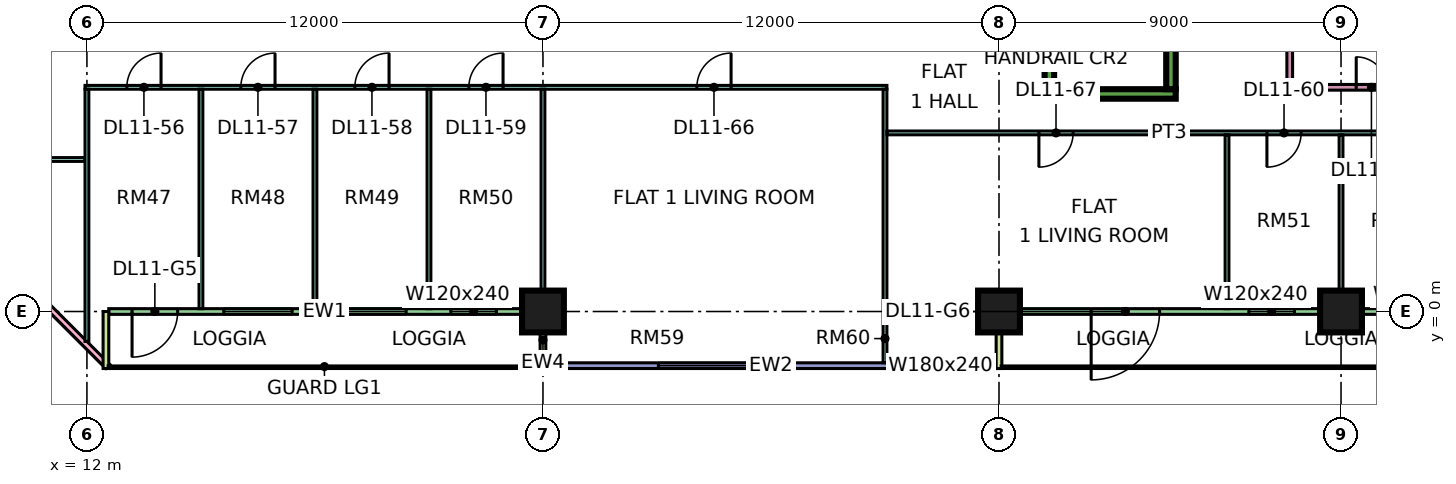
"""IFC4 building model, lengths in metres.
Left out: names, types, materials, properties, quantities, classifications, styles, units other than length and angle.
Written with IfcOpenShell. Run it as: python <this file> out.ifc"""

import sys

from ifc_helpers import new_model, si_unit, direction, frame, frame_2d, origin, origin_2d, place, context, subcontext, project, spatial, rectangle, extrude, element, fill, save


model = new_model("IFC4")
c1 = context("Model", 3, precision=1e-05, world=origin(), true_north=direction((0.0, 1.0)))
c2 = subcontext(c1, "Body", "Model", "MODEL_VIEW")
j1 = project(units=[si_unit("LENGTHUNIT", "METRE"), si_unit("PLANEANGLEUNIT", "RADIAN")], contexts=[c1])
p1 = place(None, origin())
s1 = spatial("IfcSite", under=j1, at=p1, CompositionType="ELEMENT")
p2 = place(p1, origin())
s2 = spatial("IfcBuilding", under=s1, at=p2, CompositionType="ELEMENT")
p3 = place(p2, frame((0.0, 0.0, 56.4)))
s3 = spatial("IfcBuildingStorey", under=s2, at=p3, CompositionType="ELEMENT", Elevation=56.4)
for number, where, z_axis, x_axis in (
    (1, (24.0, 0.0, 0.0), (0.0, 0.0, 1.0), (1.0, 0.0, 0.0)),
    (2, (36.0, 0.0, 0.0), (0.0, 0.0, 1.0), (1.0, 0.0, 0.0)),
    (3, (45.0, 0.0, 0.0), (0.0, 0.0, 1.0), (1.0, 0.0, 0.0)),
):
    element("IfcColumn", number, at=place(p3, frame(where, z_axis=z_axis, x_axis=x_axis)), inside=s3, PredefinedType="COLUMN", context=c2, shape_type="SweptSolid", body=[
        extrude(rectangle(XDim=1.1, YDim=1.1, at=origin_2d()), origin(), (0.0, 0.0, 1.0), 3.75),
    ])
p4 = place(p3, frame((37.2, 5.725, 0.0), z_axis=(0.0, 0.0, 1.0), x_axis=(1.0, 0.0, 0.0)))
e4 = element("IfcWall", 4, at=p4, inside=s3, PredefinedType="SHEAR", context=c2, shape_type="SweptSolid", body=[
    extrude(rectangle(XDim=3.45, YDim=0.25, at=frame_2d((1.725, 0.0))), origin(), (0.0, 0.0, 1.0), 3.75),
])
for number, where, z_axis, x_axis in (
    (5, (37.325, 5.85, 0.0), (0.0, 0.0, 1.0), (0.0, 1.0, 0.0)),
    (6, (40.525, 5.85, 0.0), (0.0, 0.0, 1.0), (0.0, 1.0, 0.0)),
):
    element("IfcWall", number, at=place(p3, frame(where, z_axis=z_axis, x_axis=x_axis)), inside=s3, PredefinedType="SHEAR", context=c2, shape_type="SweptSolid", body=[
        extrude(rectangle(XDim=6.5, YDim=0.25, at=frame_2d((3.25, 0.0))), origin(), (0.0, 0.0, 1.0), 3.75),
    ])
p5 = place(p3, frame((-1.447, 12.553, 0.0), z_axis=(0.0, 0.0, 1.0), x_axis=(0.707106781187, -0.707106781187, 0.0)))
e7 = element("IfcWall", 7, at=p5, inside=s3, PredefinedType="SOLIDWALL", context=c2, shape_type="SweptSolid", body=[
    extrude(rectangle(XDim=19.799, YDim=0.15, at=frame_2d((9.899, 0.0))), origin(), (0.0, 0.0, 1.0), 3.35),
])
p6 = place(p5, frame((2.212, 0.0, 0.45)))
e8 = element("IfcOpeningElement", 8, at=p6, cuts=e7, PredefinedType="OPENING", context=c2, shape_type="SweptSolid", body=[
    extrude(rectangle(XDim=3.0, YDim=2.4, at=frame_2d((1.5, 1.2))), frame((0.0, 0.085, 0.0), z_axis=(0.0, -1.0, 0.0), x_axis=(1.0, 0.0, 0.0)), (0.0, 0.0, 1.0), 0.17),
])
p7 = place(p5, frame((10.216, 0.0, 0.45)))
e9 = element("IfcOpeningElement", 9, at=p7, cuts=e7, PredefinedType="OPENING", context=c2, shape_type="SweptSolid", body=[
    extrude(rectangle(XDim=3.0, YDim=2.4, at=frame_2d((1.5, 1.2))), frame((0.0, 0.085, 0.0), z_axis=(0.0, -1.0, 0.0), x_axis=(1.0, 0.0, 0.0)), (0.0, 0.0, 1.0), 0.17),
])
p8 = place(p3, frame((12.575, 0.0, 0.0), z_axis=(0.0, 0.0, 1.0), x_axis=(1.0, 0.0, 0.0)))
e10 = element("IfcWall", 10, at=p8, inside=s3, PredefinedType="SOLIDWALL", context=c2, shape_type="SweptSolid", body=[
    extrude(rectangle(XDim=11.35, YDim=0.15, at=frame_2d((5.675, 0.0))), origin(), (0.0, 0.0, 1.0), 3.35),
])
p9 = place(p8, frame((0.613, 0.0, 0.0)))
e11 = element("IfcOpeningElement", 11, at=p9, cuts=e10, PredefinedType="OPENING", context=c2, shape_type="SweptSolid", body=[
    extrude(rectangle(XDim=1.2, YDim=2.4, at=frame_2d((0.6, 1.2))), frame((0.0, 0.085, 0.0), z_axis=(0.0, -1.0, 0.0), x_axis=(1.0, 0.0, 0.0)), (0.0, 0.0, 1.0), 0.17),
])
p10 = place(p8, frame((3.025, 0.0, 0.45)))
e12 = element("IfcOpeningElement", 12, at=p10, cuts=e10, PredefinedType="OPENING", context=c2, shape_type="SweptSolid", body=[
    extrude(rectangle(XDim=1.8, YDim=2.4, at=frame_2d((0.9, 1.2))), frame((0.0, 0.085, 0.0), z_axis=(0.0, -1.0, 0.0), x_axis=(1.0, 0.0, 0.0)), (0.0, 0.0, 1.0), 0.17),
])
p11 = place(p8, frame((6.025, 0.0, 0.45)))
e13 = element("IfcOpeningElement", 13, at=p11, cuts=e10, PredefinedType="OPENING", context=c2, shape_type="SweptSolid", body=[
    extrude(rectangle(XDim=1.8, YDim=2.4, at=frame_2d((0.9, 1.2))), frame((0.0, 0.085, 0.0), z_axis=(0.0, -1.0, 0.0), x_axis=(1.0, 0.0, 0.0)), (0.0, 0.0, 1.0), 0.17),
])
p12 = place(p8, frame((9.0, 0.0, 0.45)))
e14 = element("IfcOpeningElement", 14, at=p12, cuts=e10, PredefinedType="OPENING", context=c2, shape_type="SweptSolid", body=[
    extrude(rectangle(XDim=1.2, YDim=2.4, at=frame_2d((0.6, 1.2))), frame((0.0, 0.085, 0.0), z_axis=(0.0, -1.0, 0.0), x_axis=(1.0, 0.0, 0.0)), (0.0, 0.0, 1.0), 0.17),
])
for number, where, z_axis, x_axis in (
    (15, (12.5, -1.5, 0.0), (0.0, 0.0, 1.0), (0.0, 1.0, 0.0)),
    (16, (24.0, -1.5, 0.0), (0.0, 0.0, 1.0), (0.0, 1.0, 0.0)),
):
    element("IfcWall", number, at=place(p3, frame(where, z_axis=z_axis, x_axis=x_axis)), inside=s3, PredefinedType="SOLIDWALL", context=c2, shape_type="SweptSolid", body=[
        extrude(rectangle(XDim=1.5, YDim=0.15, at=frame_2d((0.75, 0.0))), origin(), (0.0, 0.0, 1.0), 3.35),
    ])
p13 = place(p3, frame((24.075, -1.425, 0.0), z_axis=(0.0, 0.0, 1.0), x_axis=(1.0, 0.0, 0.0)))
e17 = element("IfcWall", 17, at=p13, inside=s3, PredefinedType="SOLIDWALL", context=c2, shape_type="SweptSolid", body=[
    extrude(rectangle(XDim=11.85, YDim=0.15, at=frame_2d((5.925, 0.0))), origin(), (0.0, 0.0, 1.0), 3.35),
])
p14 = place(p13, frame((2.962, 0.0, 0.45)))
e18 = element("IfcOpeningElement", 18, at=p14, cuts=e17, PredefinedType="OPENING", context=c2, shape_type="SweptSolid", body=[
    extrude(rectangle(XDim=3.0, YDim=2.4, at=frame_2d((1.5, 1.2))), frame((0.0, 0.085, 0.0), z_axis=(0.0, -1.0, 0.0), x_axis=(1.0, 0.0, 0.0)), (0.0, 0.0, 1.0), 0.17),
])
p15 = place(p13, frame((9.488, 0.0, 0.45)))
e19 = element("IfcOpeningElement", 19, at=p15, cuts=e17, PredefinedType="OPENING", context=c2, shape_type="SweptSolid", body=[
    extrude(rectangle(XDim=1.8, YDim=2.4, at=frame_2d((0.9, 1.2))), frame((0.0, 0.085, 0.0), z_axis=(0.0, -1.0, 0.0), x_axis=(1.0, 0.0, 0.0)), (0.0, 0.0, 1.0), 0.17),
])
p16 = place(p3, frame((36.075, 0.0, 0.0), z_axis=(0.0, 0.0, 1.0), x_axis=(1.0, 0.0, 0.0)))
e20 = element("IfcWall", 20, at=p16, inside=s3, PredefinedType="SOLIDWALL", context=c2, shape_type="SweptSolid", body=[
    extrude(rectangle(XDim=11.85, YDim=0.15, at=frame_2d((5.925, 0.0))), origin(), (0.0, 0.0, 1.0), 3.35),
])
p17 = place(p16, frame((2.35, 0.0, 0.0)))
e21 = element("IfcOpeningElement", 21, at=p17, cuts=e20, PredefinedType="OPENING", context=c2, shape_type="SweptSolid", body=[
    extrude(rectangle(XDim=1.8, YDim=2.4, at=frame_2d((0.9, 1.2))), frame((0.0, 0.085, 0.0), z_axis=(0.0, -1.0, 0.0), x_axis=(1.0, 0.0, 0.0)), (0.0, 0.0, 1.0), 0.17),
])
p18 = place(p16, frame((6.5, 0.0, 0.45)))
e22 = element("IfcOpeningElement", 22, at=p18, cuts=e20, PredefinedType="OPENING", context=c2, shape_type="SweptSolid", body=[
    extrude(rectangle(XDim=1.2, YDim=2.4, at=frame_2d((0.6, 1.2))), frame((0.0, 0.085, 0.0), z_axis=(0.0, -1.0, 0.0), x_axis=(1.0, 0.0, 0.0)), (0.0, 0.0, 1.0), 0.17),
])
p19 = place(p16, frame((10.113, 0.0, 0.45)))
e23 = element("IfcOpeningElement", 23, at=p19, cuts=e20, PredefinedType="OPENING", context=c2, shape_type="SweptSolid", body=[
    extrude(rectangle(XDim=1.2, YDim=2.4, at=frame_2d((0.6, 1.2))), frame((0.0, 0.085, 0.0), z_axis=(0.0, -1.0, 0.0), x_axis=(1.0, 0.0, 0.0)), (0.0, 0.0, 1.0), 0.17),
])
p20 = place(p3, frame((36.0, -1.5, 0.0), z_axis=(0.0, 0.0, 1.0), x_axis=(0.0, 1.0, 0.0)))
e24 = element("IfcWall", 24, at=p20, inside=s3, PredefinedType="SOLIDWALL", context=c2, shape_type="SweptSolid", body=[
    extrude(rectangle(XDim=1.5, YDim=0.15, at=frame_2d((0.75, 0.0))), origin(), (0.0, 0.0, 1.0), 3.35),
])
p21 = place(p3, frame((9.05, 4.0, 0.0), z_axis=(0.0, 0.0, 1.0), x_axis=(1.0, 0.0, 0.0)))
e25 = element("IfcWall", 25, at=p21, inside=s3, PredefinedType="PARTITIONING", context=c2, shape_type="SweptSolid", body=[
    extrude(rectangle(XDim=2.9, YDim=0.1, at=frame_2d((1.45, 0.0))), origin(), (0.0, 0.0, 1.0), 3.35),
])
p22 = place(p3, frame((11.95, 5.9, 0.0), z_axis=(0.0, 0.0, 1.0), x_axis=(1.0, 0.0, 0.0)))
e26 = element("IfcWall", 26, at=p22, inside=s3, PredefinedType="PARTITIONING", context=c2, shape_type="SweptSolid", body=[
    extrude(rectangle(XDim=21.1, YDim=0.1, at=frame_2d((10.55, 0.0))), origin(), (0.0, 0.0, 1.0), 3.35),
])
p23 = place(p22, frame((1.1, 0.0, 0.0)))
e27 = element("IfcOpeningElement", 27, at=p23, cuts=e26, PredefinedType="OPENING", context=c2, shape_type="SweptSolid", body=[
    extrude(rectangle(XDim=0.9, YDim=2.1, at=frame_2d((0.45, 1.05))), frame((0.0, 0.06, 0.0), z_axis=(0.0, -1.0, 0.0), x_axis=(1.0, 0.0, 0.0)), (0.0, 0.0, 1.0), 0.12),
])
p24 = place(p22, frame((4.1, 0.0, 0.0)))
e28 = element("IfcOpeningElement", 28, at=p24, cuts=e26, PredefinedType="OPENING", context=c2, shape_type="SweptSolid", body=[
    extrude(rectangle(XDim=0.9, YDim=2.1, at=frame_2d((0.45, 1.05))), frame((0.0, 0.06, 0.0), z_axis=(0.0, -1.0, 0.0), x_axis=(1.0, 0.0, 0.0)), (0.0, 0.0, 1.0), 0.12),
])
p25 = place(p22, frame((7.1, 0.0, 0.0)))
e29 = element("IfcOpeningElement", 29, at=p25, cuts=e26, PredefinedType="OPENING", context=c2, shape_type="SweptSolid", body=[
    extrude(rectangle(XDim=0.9, YDim=2.1, at=frame_2d((0.45, 1.05))), frame((0.0, 0.06, 0.0), z_axis=(0.0, -1.0, 0.0), x_axis=(1.0, 0.0, 0.0)), (0.0, 0.0, 1.0), 0.12),
])
p26 = place(p22, frame((10.1, 0.0, 0.0)))
e30 = element("IfcOpeningElement", 30, at=p26, cuts=e26, PredefinedType="OPENING", context=c2, shape_type="SweptSolid", body=[
    extrude(rectangle(XDim=0.9, YDim=2.1, at=frame_2d((0.45, 1.05))), frame((0.0, 0.06, 0.0), z_axis=(0.0, -1.0, 0.0), x_axis=(1.0, 0.0, 0.0)), (0.0, 0.0, 1.0), 0.12),
])
p27 = place(p22, frame((16.1, 0.0, 0.0)))
e31 = element("IfcOpeningElement", 31, at=p27, cuts=e26, PredefinedType="OPENING", context=c2, shape_type="SweptSolid", body=[
    extrude(rectangle(XDim=0.9, YDim=2.1, at=frame_2d((0.45, 1.05))), frame((0.0, 0.06, 0.0), z_axis=(0.0, -1.0, 0.0), x_axis=(1.0, 0.0, 0.0)), (0.0, 0.0, 1.0), 0.12),
])
p28 = place(p3, frame((12.0, -0.788, 0.0), z_axis=(0.0, 0.0, 1.0), x_axis=(0.0, 1.0, 0.0)))
e32 = element("IfcWall", 32, at=p28, inside=s3, PredefinedType="PARTITIONING", context=c2, shape_type="SweptSolid", body=[
    extrude(rectangle(XDim=6.638, YDim=0.1, at=frame_2d((3.319, 0.0))), origin(), (0.0, 0.0, 1.0), 3.35),
])
for number, where, z_axis, x_axis in (
    (33, (15.0, 0.074, 0.0), (0.0, 0.0, 1.0), (0.0, 1.0, 0.0)),
    (34, (18.0, 0.074, 0.0), (0.0, 0.0, 1.0), (0.0, 1.0, 0.0)),
    (35, (21.0, 0.074, 0.0), (0.0, 0.0, 1.0), (0.0, 1.0, 0.0)),
):
    element("IfcWall", number, at=place(p3, frame(where, z_axis=z_axis, x_axis=x_axis)), inside=s3, PredefinedType="PARTITIONING", context=c2, shape_type="SweptSolid", body=[
        extrude(rectangle(XDim=5.776, YDim=0.1, at=frame_2d((2.888, 0.0))), origin(), (0.0, 0.0, 1.0), 3.35),
    ])
p29 = place(p3, frame((24.0, 0.0, 0.0), z_axis=(0.0, 0.0, 1.0), x_axis=(0.0, 1.0, 0.0)))
e36 = element("IfcWall", 36, at=p29, inside=s3, PredefinedType="PARTITIONING", context=c2, shape_type="SweptSolid", body=[
    extrude(rectangle(XDim=5.85, YDim=0.1, at=frame_2d((2.925, 0.0))), origin(), (0.0, 0.0, 1.0), 3.35),
])
p30 = place(p3, frame((33.0, -1.35, 0.0), z_axis=(0.0, 0.0, 1.0), x_axis=(0.0, 1.0, 0.0)))
e37 = element("IfcWall", 37, at=p30, inside=s3, PredefinedType="PARTITIONING", context=c2, shape_type="SweptSolid", body=[
    extrude(rectangle(XDim=7.2, YDim=0.1, at=frame_2d((3.6, 0.0))), origin(), (0.0, 0.0, 1.0), 3.35),
])
p31 = place(p3, frame((33.05, 4.7, 0.0), z_axis=(0.0, 0.0, 1.0), x_axis=(1.0, 0.0, 0.0)))
e38 = element("IfcWall", 38, at=p31, inside=s3, PredefinedType="PARTITIONING", context=c2, shape_type="SweptSolid", body=[
    extrude(rectangle(XDim=14.85, YDim=0.1, at=frame_2d((7.425, 0.0))), origin(), (0.0, 0.0, 1.0), 3.35),
])
p32 = place(p31, frame((10.0, 0.0, 0.0)))
e39 = element("IfcOpeningElement", 39, at=p32, cuts=e38, PredefinedType="OPENING", context=c2, shape_type="SweptSolid", body=[
    extrude(rectangle(XDim=0.9, YDim=2.1, at=frame_2d((0.45, 1.05))), frame((0.0, 0.06, 0.0), z_axis=(0.0, -1.0, 0.0), x_axis=(1.0, 0.0, 0.0)), (0.0, 0.0, 1.0), 0.12),
])
p33 = place(p31, frame((13.0, 0.0, 0.0)))
e40 = element("IfcOpeningElement", 40, at=p33, cuts=e38, PredefinedType="OPENING", context=c2, shape_type="SweptSolid", body=[
    extrude(rectangle(XDim=0.9, YDim=2.1, at=frame_2d((0.45, 1.05))), frame((0.0, 0.06, 0.0), z_axis=(0.0, -1.0, 0.0), x_axis=(1.0, 0.0, 0.0)), (0.0, 0.0, 1.0), 0.12),
])
p34 = place(p31, frame((4.0, 0.0, 0.0)))
e41 = element("IfcOpeningElement", 41, at=p34, cuts=e38, PredefinedType="OPENING", context=c2, shape_type="SweptSolid", body=[
    extrude(rectangle(XDim=0.9, YDim=2.1, at=frame_2d((0.45, 1.05))), frame((0.0, 0.06, 0.0), z_axis=(0.0, -1.0, 0.0), x_axis=(1.0, 0.0, 0.0)), (0.0, 0.0, 1.0), 0.12),
])
p35 = place(p3, frame((42.0, 0.074, 0.0), z_axis=(0.0, 0.0, 1.0), x_axis=(0.0, 1.0, 0.0)))
e42 = element("IfcWall", 42, at=p35, inside=s3, PredefinedType="PARTITIONING", context=c2, shape_type="SweptSolid", body=[
    extrude(rectangle(XDim=4.576, YDim=0.1, at=frame_2d((2.288, 0.0))), origin(), (0.0, 0.0, 1.0), 3.35),
])
p36 = place(p3, frame((43.65, 5.825, 0.0), z_axis=(0.0, 0.0, 1.0), x_axis=(0.0, 1.0, 0.0)))
e43 = element("IfcWall", 43, at=p36, inside=s3, PredefinedType="PARTITIONING", context=c2, shape_type="SweptSolid", body=[
    extrude(rectangle(XDim=6.625, YDim=0.15, at=frame_2d((3.312, 0.0))), origin(), (0.0, 0.0, 1.0), 3.35),
])
p37 = place(p36, frame((4.425, 0.0, 0.0)))
e44 = element("IfcOpeningElement", 44, at=p37, cuts=e43, PredefinedType="OPENING", context=c2, shape_type="SweptSolid", body=[
    extrude(rectangle(XDim=0.9, YDim=2.1, at=frame_2d((0.45, 1.05))), frame((0.0, 0.085, 0.0), z_axis=(0.0, -1.0, 0.0), x_axis=(1.0, 0.0, 0.0)), (0.0, 0.0, 1.0), 0.17),
])
p38 = place(p3, frame((43.725, 5.9, 0.0), z_axis=(0.0, 0.0, 1.0), x_axis=(1.0, 0.0, 0.0)))
e45 = element("IfcWall", 45, at=p38, inside=s3, PredefinedType="PARTITIONING", context=c2, shape_type="SweptSolid", body=[
    extrude(rectangle(XDim=4.175, YDim=0.15, at=frame_2d((2.087, 0.0))), origin(), (0.0, 0.0, 1.0), 3.35),
])
p39 = place(p38, frame((1.675, 0.0, 0.0)))
e46 = element("IfcOpeningElement", 46, at=p39, cuts=e45, PredefinedType="OPENING", context=c2, shape_type="SweptSolid", body=[
    extrude(rectangle(XDim=0.8, YDim=2.1, at=frame_2d((0.4, 1.05))), frame((0.0, 0.085, 0.0), z_axis=(0.0, -1.0, 0.0), x_axis=(1.0, 0.0, 0.0)), (0.0, 0.0, 1.0), 0.17),
])
p40 = place(p3, frame((45.0, 0.074, 0.0), z_axis=(0.0, 0.0, 1.0), x_axis=(0.0, 1.0, 0.0)))
e47 = element("IfcWall", 47, at=p40, inside=s3, PredefinedType="PARTITIONING", context=c2, shape_type="SweptSolid", body=[
    extrude(rectangle(XDim=4.576, YDim=0.1, at=frame_2d((2.288, 0.0))), origin(), (0.0, 0.0, 1.0), 3.35),
])
p41 = place(p9, frame((1.2, 0.0, 0.0), z_axis=(0.0, 0.0, 1.0), x_axis=(-1.0, 0.0, 0.0)))
e48 = element("IfcDoor", 48, at=p41, inside=s3, OperationType="DOUBLE_DOOR_SINGLE_SWING", PredefinedType="DOOR", context=c2, shape_type="SweptSolid", body=[
    extrude(rectangle(XDim=1.2, YDim=2.4, at=frame_2d((0.6, 1.2))), frame((0.0, 0.025, 0.0), z_axis=(0.0, -1.0, 0.0), x_axis=(1.0, 0.0, 0.0)), (0.0, 0.0, 1.0), 0.05),
])
fill(e11, e48)
p42 = place(p10, origin())
e49 = element("IfcWindow", 49, at=p42, inside=s3, PartitioningType="SINGLE_PANEL", PredefinedType="WINDOW", context=c2, shape_type="SweptSolid", body=[
    extrude(rectangle(XDim=1.8, YDim=2.4, at=frame_2d((0.9, 1.2))), frame((0.0, 0.03, 0.0), z_axis=(0.0, -1.0, 0.0), x_axis=(1.0, 0.0, 0.0)), (0.0, 0.0, 1.0), 0.06),
])
fill(e12, e49)
p43 = place(p11, origin())
e50 = element("IfcWindow", 50, at=p43, inside=s3, PartitioningType="SINGLE_PANEL", PredefinedType="WINDOW", context=c2, shape_type="SweptSolid", body=[
    extrude(rectangle(XDim=1.8, YDim=2.4, at=frame_2d((0.9, 1.2))), frame((0.0, 0.03, 0.0), z_axis=(0.0, -1.0, 0.0), x_axis=(1.0, 0.0, 0.0)), (0.0, 0.0, 1.0), 0.06),
])
fill(e13, e50)
p44 = place(p12, origin())
e51 = element("IfcWindow", 51, at=p44, inside=s3, PartitioningType="SINGLE_PANEL", PredefinedType="WINDOW", context=c2, shape_type="SweptSolid", body=[
    extrude(rectangle(XDim=1.2, YDim=2.4, at=frame_2d((0.6, 1.2))), frame((0.0, 0.03, 0.0), z_axis=(0.0, -1.0, 0.0), x_axis=(1.0, 0.0, 0.0)), (0.0, 0.0, 1.0), 0.06),
])
fill(e14, e51)
p45 = place(p14, origin())
e52 = element("IfcWindow", 52, at=p45, inside=s3, PartitioningType="SINGLE_PANEL", PredefinedType="WINDOW", context=c2, shape_type="SweptSolid", body=[
    extrude(rectangle(XDim=3.0, YDim=2.4, at=frame_2d((1.5, 1.2))), frame((0.0, 0.03, 0.0), z_axis=(0.0, -1.0, 0.0), x_axis=(1.0, 0.0, 0.0)), (0.0, 0.0, 1.0), 0.06),
])
fill(e18, e52)
p46 = place(p15, origin())
e53 = element("IfcWindow", 53, at=p46, inside=s3, PartitioningType="SINGLE_PANEL", PredefinedType="WINDOW", context=c2, shape_type="SweptSolid", body=[
    extrude(rectangle(XDim=1.8, YDim=2.4, at=frame_2d((0.9, 1.2))), frame((0.0, 0.03, 0.0), z_axis=(0.0, -1.0, 0.0), x_axis=(1.0, 0.0, 0.0)), (0.0, 0.0, 1.0), 0.06),
])
fill(e19, e53)
p47 = place(p17, frame((1.8, 0.0, 0.0), z_axis=(0.0, 0.0, 1.0), x_axis=(-1.0, 0.0, 0.0)))
e54 = element("IfcDoor", 54, at=p47, inside=s3, OperationType="DOUBLE_DOOR_SINGLE_SWING", PredefinedType="DOOR", context=c2, shape_type="SweptSolid", body=[
    extrude(rectangle(XDim=1.8, YDim=2.4, at=frame_2d((0.9, 1.2))), frame((0.0, 0.025, 0.0), z_axis=(0.0, -1.0, 0.0), x_axis=(1.0, 0.0, 0.0)), (0.0, 0.0, 1.0), 0.05),
])
fill(e21, e54)
p48 = place(p18, origin())
e55 = element("IfcWindow", 55, at=p48, inside=s3, PartitioningType="SINGLE_PANEL", PredefinedType="WINDOW", context=c2, shape_type="SweptSolid", body=[
    extrude(rectangle(XDim=1.2, YDim=2.4, at=frame_2d((0.6, 1.2))), frame((0.0, 0.03, 0.0), z_axis=(0.0, -1.0, 0.0), x_axis=(1.0, 0.0, 0.0)), (0.0, 0.0, 1.0), 0.06),
])
fill(e22, e55)
p49 = place(p39, origin())
e56 = element("IfcDoor", 56, at=p49, inside=s3, OperationType="SINGLE_SWING_LEFT", PredefinedType="DOOR", context=c2, shape_type="SweptSolid", body=[
    extrude(rectangle(XDim=0.8, YDim=2.1, at=frame_2d((0.4, 1.05))), frame((0.0, 0.025, 0.0), z_axis=(0.0, -1.0, 0.0), x_axis=(1.0, 0.0, 0.0)), (0.0, 0.0, 1.0), 0.05),
])
fill(e46, e56)
p50 = place(p23, frame((0.9, 0.0, 0.0), z_axis=(0.0, 0.0, 1.0), x_axis=(-1.0, 0.0, 0.0)))
e57 = element("IfcDoor", 57, at=p50, inside=s3, OperationType="SINGLE_SWING_RIGHT", PredefinedType="DOOR", context=c2, shape_type="SweptSolid", body=[
    extrude(rectangle(XDim=0.9, YDim=2.1, at=frame_2d((0.45, 1.05))), frame((0.0, 0.025, 0.0), z_axis=(0.0, -1.0, 0.0), x_axis=(1.0, 0.0, 0.0)), (0.0, 0.0, 1.0), 0.05),
])
fill(e27, e57)
p51 = place(p24, frame((0.9, 0.0, 0.0), z_axis=(0.0, 0.0, 1.0), x_axis=(-1.0, 0.0, 0.0)))
e58 = element("IfcDoor", 58, at=p51, inside=s3, OperationType="SINGLE_SWING_RIGHT", PredefinedType="DOOR", context=c2, shape_type="SweptSolid", body=[
    extrude(rectangle(XDim=0.9, YDim=2.1, at=frame_2d((0.45, 1.05))), frame((0.0, 0.025, 0.0), z_axis=(0.0, -1.0, 0.0), x_axis=(1.0, 0.0, 0.0)), (0.0, 0.0, 1.0), 0.05),
])
fill(e28, e58)
p52 = place(p25, frame((0.9, 0.0, 0.0), z_axis=(0.0, 0.0, 1.0), x_axis=(-1.0, 0.0, 0.0)))
e59 = element("IfcDoor", 59, at=p52, inside=s3, OperationType="SINGLE_SWING_RIGHT", PredefinedType="DOOR", context=c2, shape_type="SweptSolid", body=[
    extrude(rectangle(XDim=0.9, YDim=2.1, at=frame_2d((0.45, 1.05))), frame((0.0, 0.025, 0.0), z_axis=(0.0, -1.0, 0.0), x_axis=(1.0, 0.0, 0.0)), (0.0, 0.0, 1.0), 0.05),
])
fill(e29, e59)
p53 = place(p26, frame((0.9, 0.0, 0.0), z_axis=(0.0, 0.0, 1.0), x_axis=(-1.0, 0.0, 0.0)))
e60 = element("IfcDoor", 60, at=p53, inside=s3, OperationType="SINGLE_SWING_RIGHT", PredefinedType="DOOR", context=c2, shape_type="SweptSolid", body=[
    extrude(rectangle(XDim=0.9, YDim=2.1, at=frame_2d((0.45, 1.05))), frame((0.0, 0.025, 0.0), z_axis=(0.0, -1.0, 0.0), x_axis=(1.0, 0.0, 0.0)), (0.0, 0.0, 1.0), 0.05),
])
fill(e30, e60)
p54 = place(p32, frame((0.9, 0.0, 0.0), z_axis=(0.0, 0.0, 1.0), x_axis=(-1.0, 0.0, 0.0)))
e61 = element("IfcDoor", 61, at=p54, inside=s3, OperationType="SINGLE_SWING_LEFT", PredefinedType="DOOR", context=c2, shape_type="SweptSolid", body=[
    extrude(rectangle(XDim=0.9, YDim=2.1, at=frame_2d((0.45, 1.05))), frame((0.0, 0.025, 0.0), z_axis=(0.0, -1.0, 0.0), x_axis=(1.0, 0.0, 0.0)), (0.0, 0.0, 1.0), 0.05),
])
fill(e39, e61)
p55 = place(p27, frame((0.9, 0.0, 0.0), z_axis=(0.0, 0.0, 1.0), x_axis=(-1.0, 0.0, 0.0)))
e62 = element("IfcDoor", 62, at=p55, inside=s3, OperationType="SINGLE_SWING_RIGHT", PredefinedType="DOOR", context=c2, shape_type="SweptSolid", body=[
    extrude(rectangle(XDim=0.9, YDim=2.1, at=frame_2d((0.45, 1.05))), frame((0.0, 0.025, 0.0), z_axis=(0.0, -1.0, 0.0), x_axis=(1.0, 0.0, 0.0)), (0.0, 0.0, 1.0), 0.05),
])
fill(e31, e62)
p56 = place(p34, frame((0.9, 0.0, 0.0), z_axis=(0.0, 0.0, 1.0), x_axis=(-1.0, 0.0, 0.0)))
e63 = element("IfcDoor", 63, at=p56, inside=s3, OperationType="SINGLE_SWING_LEFT", PredefinedType="DOOR", context=c2, shape_type="SweptSolid", body=[
    extrude(rectangle(XDim=0.9, YDim=2.1, at=frame_2d((0.45, 1.05))), frame((0.0, 0.025, 0.0), z_axis=(0.0, -1.0, 0.0), x_axis=(1.0, 0.0, 0.0)), (0.0, 0.0, 1.0), 0.05),
])
fill(e41, e63)
save(model, sys.argv[1])
